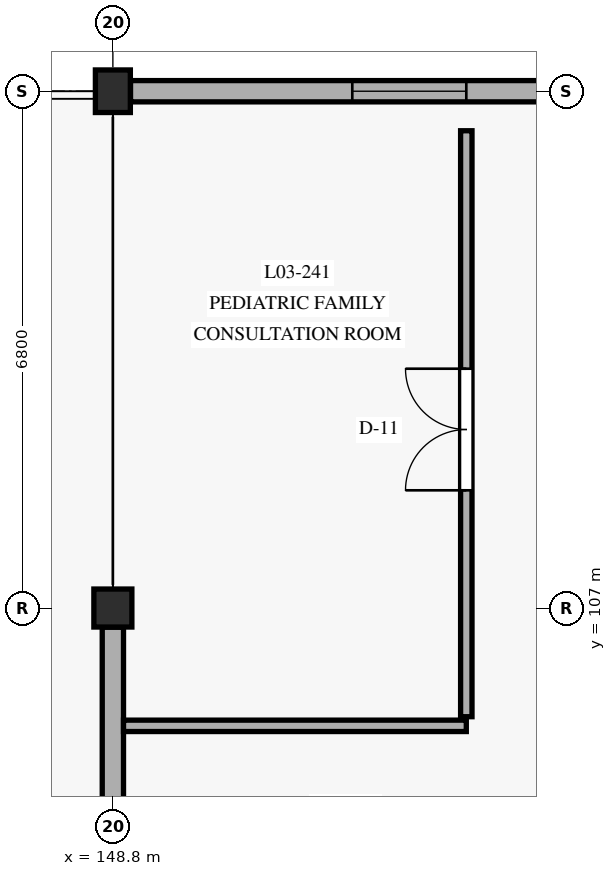
"""IFC4 building model, lengths in metres.
Left out: names, types, materials, properties, quantities, classifications, styles, units other than length and angle.
Written with IfcOpenShell. Run it as: python <this file> out.ifc"""

import sys

from ifc_helpers import new_model, si_unit, direction, frame, frame_2d, origin, origin_with_axes, origin_2d, place, context, subcontext, project, spatial, rectangle, extrude, element, fill, save


model = new_model("IFC4")
c1 = context("Model", 3, precision=1e-05, world=origin(), true_north=direction((0.0, 1.0)))
c2 = subcontext(c1, "Body", "Model", "MODEL_VIEW")
j1 = project(units=[si_unit("LENGTHUNIT", "METRE"), si_unit("PLANEANGLEUNIT", "RADIAN")], contexts=[c1])
p1 = place(None, origin())
s1 = spatial("IfcSite", under=j1, at=p1, CompositionType="ELEMENT")
p2 = place(p1, origin())
s2 = spatial("IfcBuilding", under=s1, at=p2, CompositionType="ELEMENT")
p3 = place(p2, frame((0.0, 0.0, 9.3)))
s3 = spatial("IfcBuildingStorey", under=s2, at=p3, CompositionType="ELEMENT", Elevation=9.3)
p4 = place(p3, frame((148.8, 107.0, 0.0), z_axis=(0.0, 0.0, 1.0), x_axis=(1.0, 0.0, 0.0)))
e1 = element("IfcColumn", 1, at=p4, inside=s3, PredefinedType="COLUMN", context=c2, shape_type="SweptSolid", body=[
    extrude(rectangle(XDim=0.5, YDim=0.5, at=origin_2d()), origin(), (0.0, 0.0, 1.0), 4.2),
])
p5 = place(p3, frame((148.8, 113.8, 0.0), z_axis=(0.0, 0.0, 1.0), x_axis=(1.0, 0.0, 0.0)))
e2 = element("IfcColumn", 2, at=p5, inside=s3, PredefinedType="COLUMN", context=c2, shape_type="SweptSolid", body=[
    extrude(rectangle(XDim=0.46, YDim=0.56, at=origin_2d()), origin(), (0.0, 0.0, 1.0), 4.2),
])
p6 = place(p3, frame((148.8, 106.748, 0.0), z_axis=(0.0, 0.0, 1.0), x_axis=(0.0, -1.0, 0.0)))
e3 = element("IfcWall", 3, at=p6, inside=s3, PredefinedType="SOLIDWALL", context=c2, shape_type="SweptSolid", body=[
    extrude(rectangle(XDim=6.096, YDim=0.28, at=frame_2d((3.048, 0.0))), origin(), (0.0, 0.0, 1.0), 3.57),
])
p7 = place(p6, frame((2.478, 0.0, 0.0)))
e4 = element("IfcOpeningElement", 4, at=p7, cuts=e3, PredefinedType="OPENING", context=c2, shape_type="SweptSolid", body=[
    extrude(rectangle(XDim=1.14, YDim=2.3, at=frame_2d((0.57, 1.15))), frame((0.0, 0.15, 0.0), z_axis=(0.0, -1.0, 0.0), x_axis=(1.0, 0.0, 0.0)), (0.0, 0.0, 1.0), 0.3),
])
p8 = place(p3, frame((156.368, 113.8, 0.0), z_axis=(0.0, 0.0, 1.0), x_axis=(-1.0, 0.0, 0.0)))
e5 = element("IfcWall", 5, at=p8, inside=s3, PredefinedType="SOLIDWALL", context=c2, shape_type="SweptSolid", body=[
    extrude(rectangle(XDim=7.336, YDim=0.28, at=frame_2d((3.668, 0.0))), origin(), (0.0, 0.0, 1.0), 3.4),
])
p9 = place(p8, frame((2.918, 0.0, 0.9)))
e6 = element("IfcOpeningElement", 6, at=p9, cuts=e5, PredefinedType="OPENING", context=c2, shape_type="SweptSolid", body=[
    extrude(rectangle(XDim=1.5, YDim=2.2, at=frame_2d((0.75, 1.1))), frame((0.0, 0.15, 0.0), z_axis=(0.0, -1.0, 0.0), x_axis=(1.0, 0.0, 0.0)), (0.0, 0.0, 1.0), 0.3),
])
p10 = place(p3, frame((153.45, 105.57, 0.0), z_axis=(0.0, 0.0, 1.0), x_axis=(0.0, 1.0, 0.0)))
e7 = element("IfcWall", 7, at=p10, inside=s3, PredefinedType="PARTITIONING", context=c2, shape_type="SweptSolid", body=[
    extrude(rectangle(XDim=7.71, YDim=0.15, at=frame_2d((3.855, 0.0))), origin(), (0.0, 0.0, 1.0), 3.495),
])
p11 = place(p10, frame((2.979, 0.0, 0.0)))
e8 = element("IfcOpeningElement", 8, at=p11, cuts=e7, PredefinedType="OPENING", context=c2, shape_type="SweptSolid", body=[
    extrude(rectangle(XDim=1.6, YDim=2.25, at=frame_2d((0.8, 1.125))), frame((0.0, 0.085, 0.0), z_axis=(0.0, -1.0, 0.0), x_axis=(1.0, 0.0, 0.0)), (0.0, 0.0, 1.0), 0.17),
])
p12 = place(p3, frame((148.94, 105.45, 0.0), z_axis=(0.0, 0.0, 1.0), x_axis=(1.0, 0.0, 0.0)))
e9 = element("IfcWall", 9, at=p12, inside=s3, PredefinedType="PARTITIONING", context=c2, shape_type="SweptSolid", body=[
    extrude(rectangle(XDim=4.51, YDim=0.15, at=frame_2d((2.255, 0.0))), origin(), (0.0, 0.0, 1.0), 3.565),
])
p13 = place(p9, origin_with_axes())
e10 = element("IfcWindow", 10, at=p13, inside=s3, PartitioningType="SINGLE_PANEL", PredefinedType="WINDOW", context=c2, shape_type="SweptSolid", body=[
    extrude(rectangle(XDim=1.5, YDim=2.2, at=frame_2d((0.75, 1.1))), frame((0.0, 0.03, 0.0), z_axis=(0.0, -1.0, 0.0), x_axis=(1.0, 0.0, 0.0)), (0.0, 0.0, 1.0), 0.06),
])
fill(e6, e10)
p14 = place(p11, origin_with_axes())
e11 = element("IfcDoor", 11, at=p14, inside=s3, OperationType="DOUBLE_DOOR_SINGLE_SWING", PredefinedType="DOOR", context=c2, shape_type="SweptSolid", body=[
    extrude(rectangle(XDim=1.6, YDim=2.25, at=frame_2d((0.8, 1.125))), frame((0.0, 0.025, 0.0), z_axis=(0.0, -1.0, 0.0), x_axis=(1.0, 0.0, 0.0)), (0.0, 0.0, 1.0), 0.05),
])
fill(e8, e11)
save(model, sys.argv[1])
